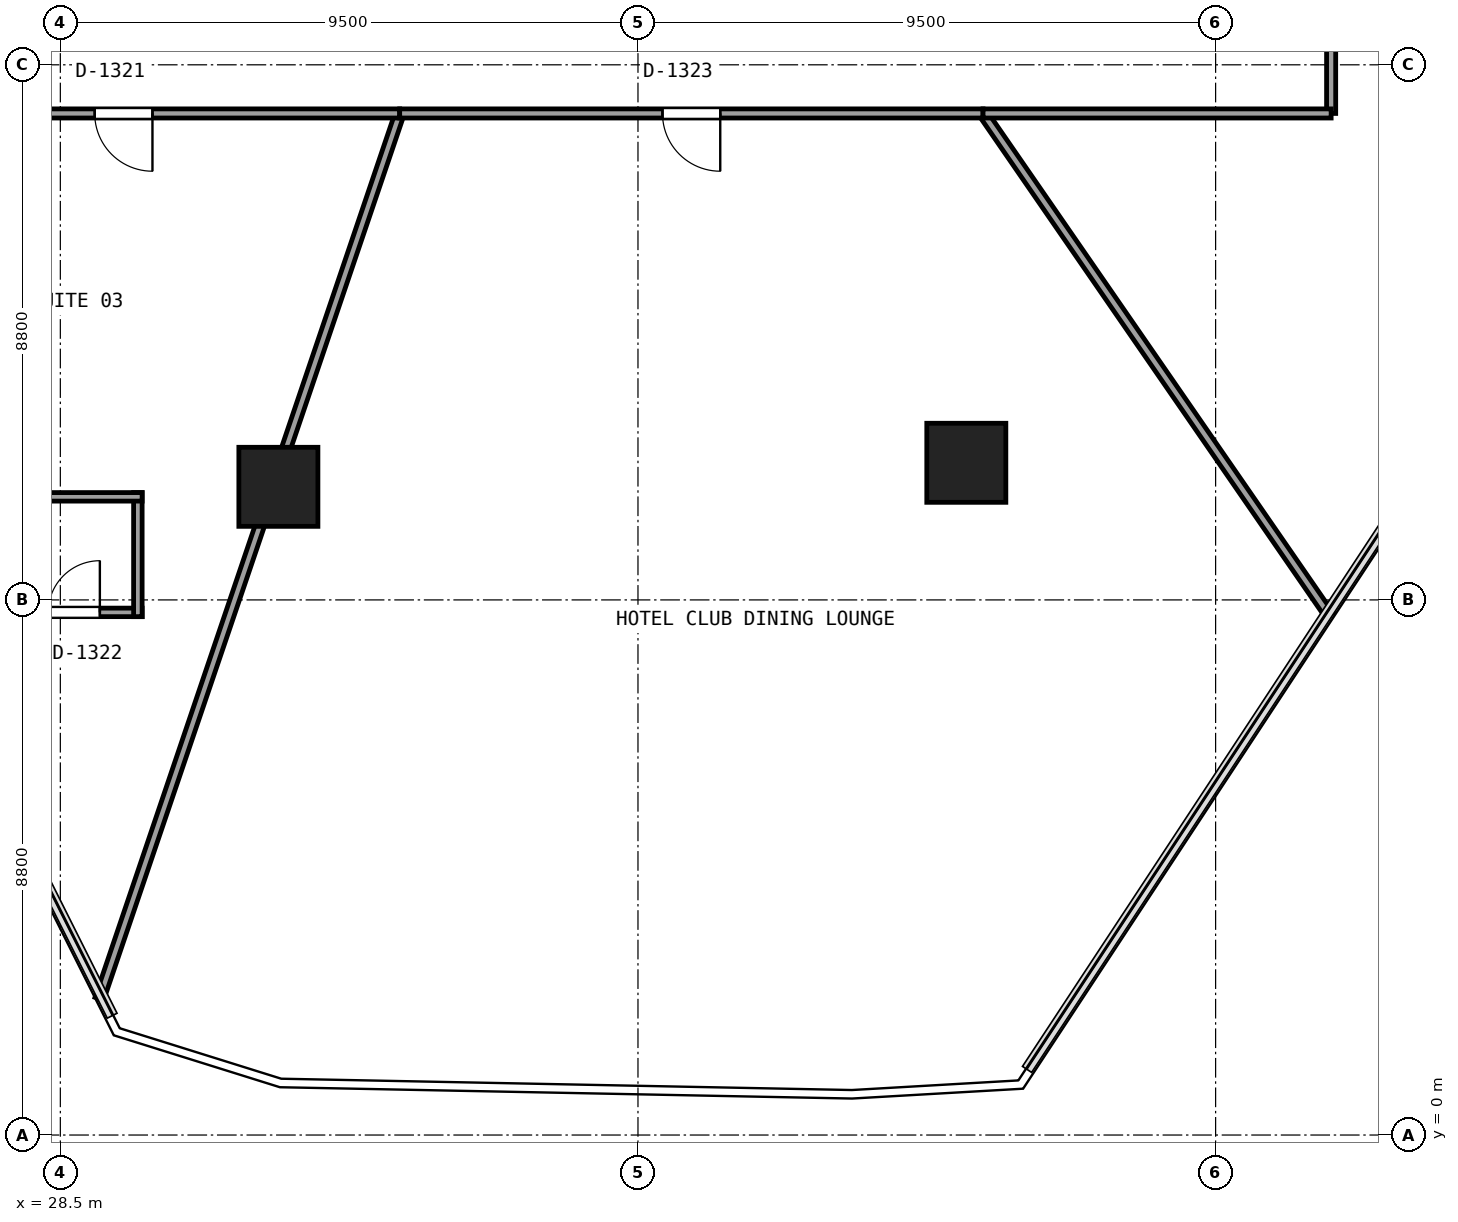
"""IFC4 building model, lengths in metres.
Left out: names, types, materials, properties, quantities, classifications, styles, units other than length and angle.
Written with IfcOpenShell. Run it as: python <this file> out.ifc"""

import sys

from ifc_helpers import new_model, si_unit, direction, frame, frame_2d, origin, origin_2d, place, context, subcontext, project, spatial, rectangle, extrude, element, fill, save


model = new_model("IFC4")
c1 = context("Model", 3, precision=1e-05, world=origin(), true_north=direction((0.0, 1.0)))
c2 = subcontext(c1, "Body", "Model", "MODEL_VIEW")
j1 = project(units=[si_unit("LENGTHUNIT", "METRE"), si_unit("PLANEANGLEUNIT", "RADIAN")], contexts=[c1])
p1 = place(None, origin())
s1 = spatial("IfcSite", under=j1, at=p1, CompositionType="ELEMENT")
p2 = place(p1, origin())
s2 = spatial("IfcBuilding", under=s1, at=p2, CompositionType="ELEMENT")
p3 = place(p2, frame((0.0, 0.0, 54.6)))
s3 = spatial("IfcBuildingStorey", under=s2, at=p3, CompositionType="ELEMENT", Elevation=54.6)
for number, where, z_axis, x_axis in (
    (1, (32.086, 10.66, 0.0), (0.0, 0.0, 1.0), (1.0, 0.0, 0.0)),
    (2, (43.4, 11.055, 0.0), (0.0, 0.0, 1.0), (1.0, 0.0, 0.0)),
):
    element("IfcColumn", number, at=place(p3, frame(where, z_axis=z_axis, x_axis=x_axis)), inside=s3, PredefinedType="COLUMN", context=c2, shape_type="SweptSolid", body=[
        extrude(rectangle(XDim=1.3, YDim=1.3, at=origin_2d()), origin(), (0.0, 0.0, 1.0), 3.17),
    ])
p4 = place(p3, frame((27.605, 8.595, 0.0), z_axis=(0.0, 0.0, 1.0), x_axis=(1.0, 0.0, 0.0)))
e3 = element("IfcWall", 3, at=p4, inside=s3, PredefinedType="PARTITIONING", context=c2, shape_type="SweptSolid", body=[
    extrude(rectangle(XDim=2.24, YDim=0.14, at=frame_2d((1.12, 0.0))), origin(), (0.0, 0.0, 1.0), 3.17),
])
p5 = place(p4, frame((0.695, 0.0, 0.0)))
e4 = element("IfcOpeningElement", 4, at=p5, cuts=e3, PredefinedType="OPENING", context=c2, shape_type="SweptSolid", body=[
    extrude(rectangle(XDim=0.85, YDim=2.1, at=frame_2d((0.425, 1.05))), frame((0.0, 0.08, 0.0), z_axis=(0.0, -1.0, 0.0), x_axis=(1.0, 0.0, 0.0)), (0.0, 0.0, 1.0), 0.16),
])
p6 = place(p3, frame((29.775, 8.525, 0.0), z_axis=(0.0, 0.0, 1.0), x_axis=(0.0, 1.0, 0.0)))
e5 = element("IfcWall", 5, at=p6, inside=s3, PredefinedType="PARTITIONING", context=c2, shape_type="SweptSolid", body=[
    extrude(rectangle(XDim=2.04, YDim=0.14, at=frame_2d((1.02, 0.0))), origin(), (0.0, 0.0, 1.0), 3.17),
])
p7 = place(p3, frame((29.845, 10.495, 0.0), z_axis=(0.0, 0.0, 1.0), x_axis=(-1.0, 0.0, 0.0)))
e6 = element("IfcWall", 6, at=p7, inside=s3, PredefinedType="PARTITIONING", context=c2, shape_type="SweptSolid", body=[
    extrude(rectangle(XDim=2.24, YDim=0.14, at=frame_2d((1.12, 0.0))), origin(), (0.0, 0.0, 1.0), 3.17),
])
p8 = place(p3, frame((29.141, 2.24, 0.0), z_axis=(0.0, 0.0, 1.0), x_axis=(0.321291767727, 0.946980253221, 0.0)))
e7 = element("IfcWall", 7, at=p8, inside=s3, PredefinedType="PARTITIONING", context=c2, shape_type="SweptSolid", body=[
    extrude(rectangle(XDim=15.375, YDim=0.15, at=frame_2d((7.688, 0.0))), origin(), (0.0, 0.0, 1.0), 2.395),
])
p9 = place(p3, frame((34.081, 16.8, 0.0), z_axis=(0.0, 0.0, 1.0), x_axis=(-1.0, 0.0, 0.0)))
e8 = element("IfcWall", 8, at=p9, inside=s3, PredefinedType="PARTITIONING", context=c2, shape_type="SweptSolid", body=[
    extrude(rectangle(XDim=9.081, YDim=0.15, at=frame_2d((4.541, 0.0))), origin(), (0.0, 0.0, 1.0), 2.355),
])
p10 = place(p9, frame((4.066, 0.0, 0.0)))
e9 = element("IfcOpeningElement", 9, at=p10, cuts=e8, PredefinedType="OPENING", context=c2, shape_type="SweptSolid", body=[
    extrude(rectangle(XDim=0.95, YDim=2.15, at=frame_2d((0.475, 1.075))), frame((0.0, 0.085, 0.0), z_axis=(0.0, -1.0, 0.0), x_axis=(1.0, 0.0, 0.0)), (0.0, 0.0, 1.0), 0.17),
])
p11 = place(p3, frame((49.371, 8.547, 0.0), z_axis=(0.0, 0.0, 1.0), x_axis=(-0.568028196619, 0.823009093416, 0.0)))
e10 = element("IfcWall", 10, at=p11, inside=s3, PredefinedType="PARTITIONING", context=c2, shape_type="SweptSolid", body=[
    extrude(rectangle(XDim=10.028, YDim=0.15, at=frame_2d((5.014, 0.0))), origin(), (0.0, 0.0, 1.0), 2.355),
])
p12 = place(p3, frame((43.675, 16.8, 0.0), z_axis=(0.0, 0.0, 1.0), x_axis=(-1.0, 0.0, 0.0)))
e11 = element("IfcWall", 11, at=p12, inside=s3, PredefinedType="PARTITIONING", context=c2, shape_type="SweptSolid", body=[
    extrude(rectangle(XDim=9.594, YDim=0.15, at=frame_2d((4.797, 0.0))), origin(), (0.0, 0.0, 1.0), 2.395),
])
p13 = place(p12, frame((4.322, 0.0, 0.0)))
e12 = element("IfcOpeningElement", 12, at=p13, cuts=e11, PredefinedType="OPENING", context=c2, shape_type="SweptSolid", body=[
    extrude(rectangle(XDim=0.95, YDim=2.15, at=frame_2d((0.475, 1.075))), frame((0.0, 0.085, 0.0), z_axis=(0.0, -1.0, 0.0), x_axis=(1.0, 0.0, 0.0)), (0.0, 0.0, 1.0), 0.17),
])
p14 = place(p3, frame((49.4, 18.6, 0.0), z_axis=(0.0, 0.0, 1.0), x_axis=(0.0, -1.0, 0.0)))
e13 = element("IfcWall", 13, at=p14, inside=s3, PredefinedType="PARTITIONING", context=c2, shape_type="SweptSolid", body=[
    extrude(rectangle(XDim=1.8, YDim=0.15, at=frame_2d((0.9, 0.0))), origin(), (0.0, 0.0, 1.0), 2.355),
])
p15 = place(p3, frame((49.4, 16.8, 0.0), z_axis=(0.0, 0.0, 1.0), x_axis=(-1.0, 0.0, 0.0)))
e14 = element("IfcWall", 14, at=p15, inside=s3, PredefinedType="PARTITIONING", context=c2, shape_type="SweptSolid", body=[
    extrude(rectangle(XDim=5.725, YDim=0.15, at=frame_2d((2.862, 0.0))), origin(), (0.0, 0.0, 1.0), 2.355),
])
p16 = place(p10, origin())
e15 = element("IfcDoor", 15, at=p16, inside=s3, OperationType="SINGLE_SWING_LEFT", PredefinedType="DOOR", context=c2, shape_type="SweptSolid", body=[
    extrude(rectangle(XDim=0.95, YDim=2.15, at=frame_2d((0.475, 1.075))), frame((0.0, 0.025, 0.0), z_axis=(0.0, -1.0, 0.0), x_axis=(1.0, 0.0, 0.0)), (0.0, 0.0, 1.0), 0.05),
])
fill(e9, e15)
p17 = place(p5, origin())
e16 = element("IfcDoor", 16, at=p17, inside=s3, OperationType="SINGLE_SWING_RIGHT", PredefinedType="DOOR", context=c2, shape_type="SweptSolid", body=[
    extrude(rectangle(XDim=0.85, YDim=2.1, at=frame_2d((0.425, 1.05))), frame((0.0, 0.025, 0.0), z_axis=(0.0, -1.0, 0.0), x_axis=(1.0, 0.0, 0.0)), (0.0, 0.0, 1.0), 0.05),
])
fill(e4, e16)
p18 = place(p13, origin())
e17 = element("IfcDoor", 17, at=p18, inside=s3, OperationType="SINGLE_SWING_LEFT", PredefinedType="DOOR", context=c2, shape_type="SweptSolid", body=[
    extrude(rectangle(XDim=0.95, YDim=2.15, at=frame_2d((0.475, 1.075))), frame((0.0, 0.025, 0.0), z_axis=(0.0, -1.0, 0.0), x_axis=(1.0, 0.0, 0.0)), (0.0, 0.0, 1.0), 0.05),
])
fill(e12, e17)
save(model, sys.argv[1])
